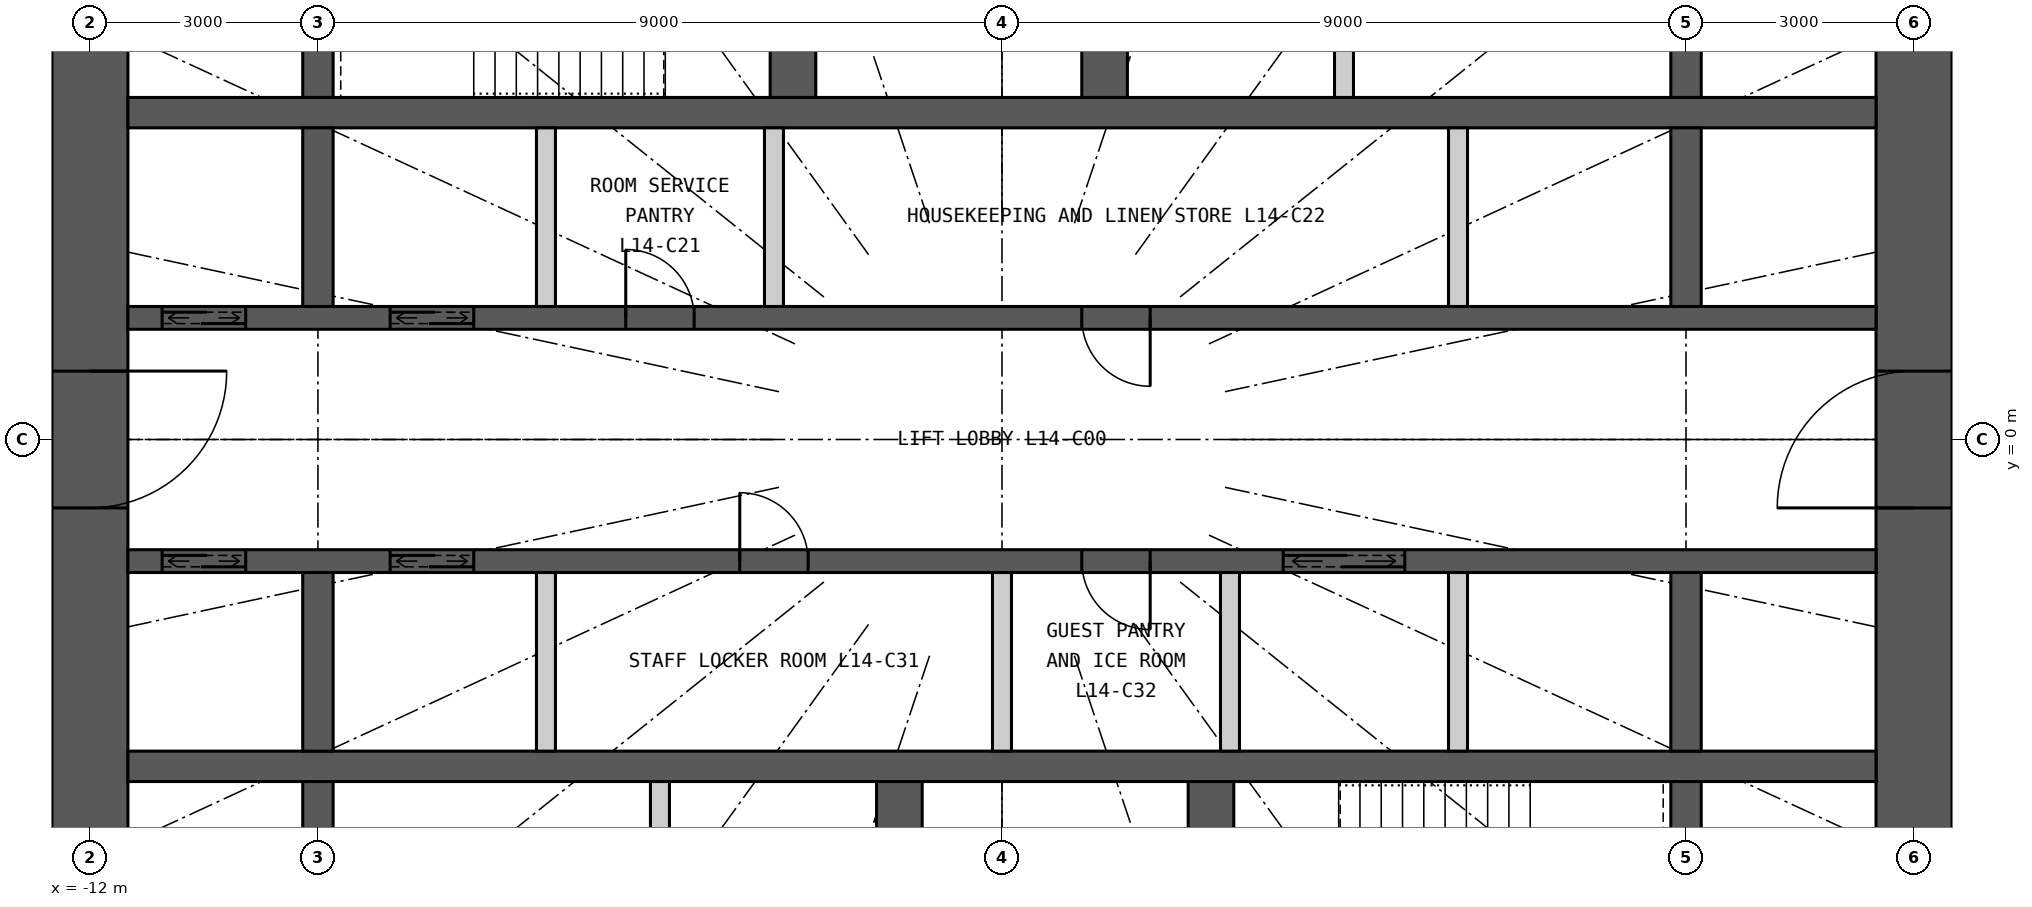
"""IFC4 building model, lengths in metres.
Left out: names, types, materials, properties, quantities, classifications, styles, units other than length and angle.
Written with IfcOpenShell. Run it as: python <this file> out.ifc"""

import sys

from ifc_helpers import new_model, si_unit, direction, frame, frame_2d, origin, place, context, subcontext, project, spatial, rectangle, extrude, element, fill, save


model = new_model("IFC4")
c1 = context("Model", 3, precision=1e-05, world=origin(), true_north=direction((0.0, 1.0)))
c2 = subcontext(c1, "Body", "Model", "MODEL_VIEW")
j1 = project(units=[si_unit("LENGTHUNIT", "METRE"), si_unit("PLANEANGLEUNIT", "RADIAN")], contexts=[c1])
p1 = place(None, origin())
s1 = spatial("IfcSite", under=j1, at=p1, CompositionType="ELEMENT")
p2 = place(p1, origin())
s2 = spatial("IfcBuilding", under=s1, at=p2, CompositionType="ELEMENT")
p3 = place(p2, frame((0.0, 0.0, 60.6)))
s3 = spatial("IfcBuildingStorey", under=s2, at=p3, CompositionType="ELEMENT", Elevation=60.6)
p4 = place(p3, frame((12.0, -7.5, 0.0), z_axis=(0.0, 0.0, 1.0), x_axis=(0.0, 1.0, 0.0)))
e1 = element("IfcWall", 1, at=p4, inside=s3, PredefinedType="SHEAR", context=c2, shape_type="SweptSolid", body=[
    extrude(rectangle(XDim=15.0, YDim=1.0, at=frame_2d((7.5, 0.0))), origin(), (0.0, 0.0, 1.0), 3.3),
])
p5 = place(p4, frame((6.6, 0.0, 0.0)))
e2 = element("IfcOpeningElement", 2, at=p5, cuts=e1, PredefinedType="OPENING", context=c2, shape_type="SweptSolid", body=[
    extrude(rectangle(XDim=1.8, YDim=2.2, at=frame_2d((0.9, 1.1))), frame((0.0, 0.51, 0.0), z_axis=(0.0, -1.0, 0.0), x_axis=(1.0, 0.0, 0.0)), (0.0, 0.0, 1.0), 1.02),
])
p6 = place(p3, frame((-12.0, 7.5, 0.0), z_axis=(0.0, 0.0, 1.0), x_axis=(0.0, -1.0, 0.0)))
e3 = element("IfcWall", 3, at=p6, inside=s3, PredefinedType="SHEAR", context=c2, shape_type="SweptSolid", body=[
    extrude(rectangle(XDim=15.0, YDim=1.0, at=frame_2d((7.5, 0.0))), origin(), (0.0, 0.0, 1.0), 3.3),
])
p7 = place(p6, frame((6.6, 0.0, 0.0)))
e4 = element("IfcOpeningElement", 4, at=p7, cuts=e3, PredefinedType="OPENING", context=c2, shape_type="SweptSolid", body=[
    extrude(rectangle(XDim=1.8, YDim=2.2, at=frame_2d((0.9, 1.1))), frame((0.0, 0.51, 0.0), z_axis=(0.0, -1.0, 0.0), x_axis=(1.0, 0.0, 0.0)), (0.0, 0.0, 1.0), 1.02),
])
p8 = place(p3, frame((-11.5, 4.3, 0.0), z_axis=(0.0, 0.0, 1.0), x_axis=(1.0, 0.0, 0.0)))
e5 = element("IfcWall", 5, at=p8, inside=s3, PredefinedType="SHEAR", context=c2, shape_type="SweptSolid", body=[
    extrude(rectangle(XDim=23.0, YDim=0.4, at=frame_2d((11.5, 0.0))), origin(), (0.0, 0.0, 1.0), 3.3),
])
p9 = place(p3, frame((-11.5, 1.6, 0.0), z_axis=(0.0, 0.0, 1.0), x_axis=(1.0, 0.0, 0.0)))
e6 = element("IfcWall", 6, at=p9, inside=s3, PredefinedType="SHEAR", context=c2, shape_type="SweptSolid", body=[
    extrude(rectangle(XDim=23.0, YDim=0.3, at=frame_2d((11.5, 0.0))), origin(), (0.0, 0.0, 1.0), 3.3),
])
p10 = place(p9, frame((0.45, 0.0, 0.0)))
e7 = element("IfcOpeningElement", 7, at=p10, cuts=e6, PredefinedType="OPENING", context=c2, shape_type="SweptSolid", body=[
    extrude(rectangle(XDim=1.1, YDim=2.2, at=frame_2d((0.55, 1.1))), frame((0.0, 0.16, 0.0), z_axis=(0.0, -1.0, 0.0), x_axis=(1.0, 0.0, 0.0)), (0.0, 0.0, 1.0), 0.32),
])
p11 = place(p9, frame((3.45, 0.0, 0.0)))
e8 = element("IfcOpeningElement", 8, at=p11, cuts=e6, PredefinedType="OPENING", context=c2, shape_type="SweptSolid", body=[
    extrude(rectangle(XDim=1.1, YDim=2.2, at=frame_2d((0.55, 1.1))), frame((0.0, 0.16, 0.0), z_axis=(0.0, -1.0, 0.0), x_axis=(1.0, 0.0, 0.0)), (0.0, 0.0, 1.0), 0.32),
])
p12 = place(p9, frame((6.55, 0.0, 0.0)))
e9 = element("IfcOpeningElement", 9, at=p12, cuts=e6, PredefinedType="OPENING", context=c2, shape_type="SweptSolid", body=[
    extrude(rectangle(XDim=0.9, YDim=2.2, at=frame_2d((0.45, 1.1))), frame((0.0, 0.16, 0.0), z_axis=(0.0, -1.0, 0.0), x_axis=(1.0, 0.0, 0.0)), (0.0, 0.0, 1.0), 0.32),
])
p13 = place(p9, frame((12.55, 0.0, 0.0)))
e10 = element("IfcOpeningElement", 10, at=p13, cuts=e6, PredefinedType="OPENING", context=c2, shape_type="SweptSolid", body=[
    extrude(rectangle(XDim=0.9, YDim=2.2, at=frame_2d((0.45, 1.1))), frame((0.0, 0.16, 0.0), z_axis=(0.0, -1.0, 0.0), x_axis=(1.0, 0.0, 0.0)), (0.0, 0.0, 1.0), 0.32),
])
p14 = place(p3, frame((-11.5, -4.3, 0.0), z_axis=(0.0, 0.0, 1.0), x_axis=(1.0, 0.0, 0.0)))
e11 = element("IfcWall", 11, at=p14, inside=s3, PredefinedType="SHEAR", context=c2, shape_type="SweptSolid", body=[
    extrude(rectangle(XDim=23.0, YDim=0.4, at=frame_2d((11.5, 0.0))), origin(), (0.0, 0.0, 1.0), 3.3),
])
p15 = place(p3, frame((-11.5, -1.6, 0.0), z_axis=(0.0, 0.0, 1.0), x_axis=(1.0, 0.0, 0.0)))
e12 = element("IfcWall", 12, at=p15, inside=s3, PredefinedType="SHEAR", context=c2, shape_type="SweptSolid", body=[
    extrude(rectangle(XDim=23.0, YDim=0.3, at=frame_2d((11.5, 0.0))), origin(), (0.0, 0.0, 1.0), 3.3),
])
p16 = place(p15, frame((0.45, 0.0, 0.0)))
e13 = element("IfcOpeningElement", 13, at=p16, cuts=e12, PredefinedType="OPENING", context=c2, shape_type="SweptSolid", body=[
    extrude(rectangle(XDim=1.1, YDim=2.2, at=frame_2d((0.55, 1.1))), frame((0.0, 0.16, 0.0), z_axis=(0.0, -1.0, 0.0), x_axis=(1.0, 0.0, 0.0)), (0.0, 0.0, 1.0), 0.32),
])
p17 = place(p15, frame((3.45, 0.0, 0.0)))
e14 = element("IfcOpeningElement", 14, at=p17, cuts=e12, PredefinedType="OPENING", context=c2, shape_type="SweptSolid", body=[
    extrude(rectangle(XDim=1.1, YDim=2.2, at=frame_2d((0.55, 1.1))), frame((0.0, 0.16, 0.0), z_axis=(0.0, -1.0, 0.0), x_axis=(1.0, 0.0, 0.0)), (0.0, 0.0, 1.0), 0.32),
])
p18 = place(p15, frame((15.2, 0.0, 0.0)))
e15 = element("IfcOpeningElement", 15, at=p18, cuts=e12, PredefinedType="OPENING", context=c2, shape_type="SweptSolid", body=[
    extrude(rectangle(XDim=1.6, YDim=2.4, at=frame_2d((0.8, 1.2))), frame((0.0, 0.16, 0.0), z_axis=(0.0, -1.0, 0.0), x_axis=(1.0, 0.0, 0.0)), (0.0, 0.0, 1.0), 0.32),
])
p19 = place(p15, frame((8.05, 0.0, 0.0)))
e16 = element("IfcOpeningElement", 16, at=p19, cuts=e12, PredefinedType="OPENING", context=c2, shape_type="SweptSolid", body=[
    extrude(rectangle(XDim=0.9, YDim=2.2, at=frame_2d((0.45, 1.1))), frame((0.0, 0.16, 0.0), z_axis=(0.0, -1.0, 0.0), x_axis=(1.0, 0.0, 0.0)), (0.0, 0.0, 1.0), 0.32),
])
p20 = place(p15, frame((12.55, 0.0, 0.0)))
e17 = element("IfcOpeningElement", 17, at=p20, cuts=e12, PredefinedType="OPENING", context=c2, shape_type="SweptSolid", body=[
    extrude(rectangle(XDim=0.9, YDim=2.2, at=frame_2d((0.45, 1.1))), frame((0.0, 0.16, 0.0), z_axis=(0.0, -1.0, 0.0), x_axis=(1.0, 0.0, 0.0)), (0.0, 0.0, 1.0), 0.32),
])
p21 = place(p3, frame((-9.0, 4.5, 0.0), z_axis=(0.0, 0.0, 1.0), x_axis=(0.0, 1.0, 0.0)))
e18 = element("IfcWall", 18, at=p21, inside=s3, PredefinedType="SHEAR", context=c2, shape_type="SweptSolid", body=[
    extrude(rectangle(XDim=3.0, YDim=0.4, at=frame_2d((1.5, 0.0))), origin(), (0.0, 0.0, 1.0), 3.3),
])
for number, where, z_axis, x_axis in (
    (19, (-9.0, 1.75, 0.0), (0.0, 0.0, 1.0), (0.0, 1.0, 0.0)),
    (20, (-9.0, -4.1, 0.0), (0.0, 0.0, 1.0), (0.0, 1.0, 0.0)),
):
    element("IfcWall", number, at=place(p3, frame(where, z_axis=z_axis, x_axis=x_axis)), inside=s3, PredefinedType="SHEAR", context=c2, shape_type="SweptSolid", body=[
        extrude(rectangle(XDim=2.35, YDim=0.4, at=frame_2d((1.175, 0.0))), origin(), (0.0, 0.0, 1.0), 3.3),
    ])
for number, where, z_axis, x_axis in (
    (21, (-9.0, -7.5, 0.0), (0.0, 0.0, 1.0), (0.0, 1.0, 0.0)),
    (22, (9.0, 4.5, 0.0), (0.0, 0.0, 1.0), (0.0, 1.0, 0.0)),
):
    element("IfcWall", number, at=place(p3, frame(where, z_axis=z_axis, x_axis=x_axis)), inside=s3, PredefinedType="SHEAR", context=c2, shape_type="SweptSolid", body=[
        extrude(rectangle(XDim=3.0, YDim=0.4, at=frame_2d((1.5, 0.0))), origin(), (0.0, 0.0, 1.0), 3.3),
    ])
for number, where, z_axis, x_axis in (
    (23, (9.0, 1.75, 0.0), (0.0, 0.0, 1.0), (0.0, 1.0, 0.0)),
    (24, (9.0, -4.1, 0.0), (0.0, 0.0, 1.0), (0.0, 1.0, 0.0)),
):
    element("IfcWall", number, at=place(p3, frame(where, z_axis=z_axis, x_axis=x_axis)), inside=s3, PredefinedType="SHEAR", context=c2, shape_type="SweptSolid", body=[
        extrude(rectangle(XDim=2.35, YDim=0.4, at=frame_2d((1.175, 0.0))), origin(), (0.0, 0.0, 1.0), 3.3),
    ])
p22 = place(p3, frame((9.0, -7.5, 0.0), z_axis=(0.0, 0.0, 1.0), x_axis=(0.0, 1.0, 0.0)))
e25 = element("IfcWall", 25, at=p22, inside=s3, PredefinedType="SHEAR", context=c2, shape_type="SweptSolid", body=[
    extrude(rectangle(XDim=3.0, YDim=0.4, at=frame_2d((1.5, 0.0))), origin(), (0.0, 0.0, 1.0), 3.3),
])
p23 = place(p3, frame((-2.75, 4.5, 0.0), z_axis=(0.0, 0.0, 1.0), x_axis=(0.0, 1.0, 0.0)))
e26 = element("IfcWall", 26, at=p23, inside=s3, PredefinedType="SHEAR", context=c2, shape_type="SweptSolid", body=[
    extrude(rectangle(XDim=3.0, YDim=0.6, at=frame_2d((1.5, 0.0))), origin(), (0.0, 0.0, 1.0), 3.3),
])
p24 = place(p23, frame((0.925, 0.0, 0.0)))
e27 = element("IfcOpeningElement", 27, at=p24, cuts=e26, PredefinedType="OPENING", context=c2, shape_type="SweptSolid", body=[
    extrude(rectangle(XDim=1.1, YDim=2.2, at=frame_2d((0.55, 1.1))), frame((0.0, 0.31, 0.0), z_axis=(0.0, -1.0, 0.0), x_axis=(1.0, 0.0, 0.0)), (0.0, 0.0, 1.0), 0.62),
])
p25 = place(p3, frame((1.35, 4.5, 0.0), z_axis=(0.0, 0.0, 1.0), x_axis=(0.0, 1.0, 0.0)))
e28 = element("IfcWall", 28, at=p25, inside=s3, PredefinedType="SHEAR", context=c2, shape_type="SweptSolid", body=[
    extrude(rectangle(XDim=3.0, YDim=0.6, at=frame_2d((1.5, 0.0))), origin(), (0.0, 0.0, 1.0), 3.3),
])
p26 = place(p25, frame((0.95, 0.0, 0.0)))
e29 = element("IfcOpeningElement", 29, at=p26, cuts=e28, PredefinedType="OPENING", context=c2, shape_type="SweptSolid", body=[
    extrude(rectangle(XDim=1.1, YDim=2.2, at=frame_2d((0.55, 1.1))), frame((0.0, 0.31, 0.0), z_axis=(0.0, -1.0, 0.0), x_axis=(1.0, 0.0, 0.0)), (0.0, 0.0, 1.0), 0.62),
])
p27 = place(p3, frame((4.5, 4.5, 0.0), z_axis=(0.0, 0.0, 1.0), x_axis=(0.0, 1.0, 0.0)))
e30 = element("IfcWall", 30, at=p27, inside=s3, PredefinedType="PARTITIONING", context=c2, shape_type="SweptSolid", body=[
    extrude(rectangle(XDim=3.0, YDim=0.25, at=frame_2d((1.5, 0.0))), origin(), (0.0, 0.0, 1.0), 3.3),
])
p28 = place(p3, frame((2.75, -7.5, 0.0), z_axis=(0.0, 0.0, 1.0), x_axis=(0.0, 1.0, 0.0)))
e31 = element("IfcWall", 31, at=p28, inside=s3, PredefinedType="SHEAR", context=c2, shape_type="SweptSolid", body=[
    extrude(rectangle(XDim=3.0, YDim=0.6, at=frame_2d((1.5, 0.0))), origin(), (0.0, 0.0, 1.0), 3.3),
])
p29 = place(p28, frame((0.975, 0.0, 0.0)))
e32 = element("IfcOpeningElement", 32, at=p29, cuts=e31, PredefinedType="OPENING", context=c2, shape_type="SweptSolid", body=[
    extrude(rectangle(XDim=1.1, YDim=2.2, at=frame_2d((0.55, 1.1))), frame((0.0, 0.31, 0.0), z_axis=(0.0, -1.0, 0.0), x_axis=(1.0, 0.0, 0.0)), (0.0, 0.0, 1.0), 0.62),
])
p30 = place(p3, frame((-1.35, -7.5, 0.0), z_axis=(0.0, 0.0, 1.0), x_axis=(0.0, 1.0, 0.0)))
e33 = element("IfcWall", 33, at=p30, inside=s3, PredefinedType="SHEAR", context=c2, shape_type="SweptSolid", body=[
    extrude(rectangle(XDim=3.0, YDim=0.6, at=frame_2d((1.5, 0.0))), origin(), (0.0, 0.0, 1.0), 3.3),
])
p31 = place(p30, frame((0.95, 0.0, 0.0)))
e34 = element("IfcOpeningElement", 34, at=p31, cuts=e33, PredefinedType="OPENING", context=c2, shape_type="SweptSolid", body=[
    extrude(rectangle(XDim=1.1, YDim=2.2, at=frame_2d((0.55, 1.1))), frame((0.0, 0.31, 0.0), z_axis=(0.0, -1.0, 0.0), x_axis=(1.0, 0.0, 0.0)), (0.0, 0.0, 1.0), 0.62),
])
p32 = place(p3, frame((-4.5, -7.5, 0.0), z_axis=(0.0, 0.0, 1.0), x_axis=(0.0, 1.0, 0.0)))
e35 = element("IfcWall", 35, at=p32, inside=s3, PredefinedType="PARTITIONING", context=c2, shape_type="SweptSolid", body=[
    extrude(rectangle(XDim=3.0, YDim=0.25, at=frame_2d((1.5, 0.0))), origin(), (0.0, 0.0, 1.0), 3.3),
])
for number, where, z_axis, x_axis in (
    (36, (-6.0, 1.75, 0.0), (0.0, 0.0, 1.0), (0.0, 1.0, 0.0)),
    (37, (-3.0, 1.75, 0.0), (0.0, 0.0, 1.0), (0.0, 1.0, 0.0)),
    (38, (6.0, 1.75, 0.0), (0.0, 0.0, 1.0), (0.0, 1.0, 0.0)),
    (39, (-6.0, -4.1, 0.0), (0.0, 0.0, 1.0), (0.0, 1.0, 0.0)),
    (40, (0.0, -4.1, 0.0), (0.0, 0.0, 1.0), (0.0, 1.0, 0.0)),
    (41, (3.0, -4.1, 0.0), (0.0, 0.0, 1.0), (0.0, 1.0, 0.0)),
    (42, (6.0, -4.1, 0.0), (0.0, 0.0, 1.0), (0.0, 1.0, 0.0)),
):
    element("IfcWall", number, at=place(p3, frame(where, z_axis=z_axis, x_axis=x_axis)), inside=s3, PredefinedType="PARTITIONING", context=c2, shape_type="SweptSolid", body=[
        extrude(rectangle(XDim=2.35, YDim=0.25, at=frame_2d((1.175, 0.0))), origin(), (0.0, 0.0, 1.0), 3.3),
    ])
p33 = place(p10, origin())
e43 = element("IfcDoor", 43, at=p33, inside=s3, OperationType="DOUBLE_DOOR_SLIDING", PredefinedType="DOOR", context=c2, shape_type="SweptSolid", body=[
    extrude(rectangle(XDim=1.1, YDim=2.2, at=frame_2d((0.55, 1.1))), frame((0.0, 0.025, 0.0), z_axis=(0.0, -1.0, 0.0), x_axis=(1.0, 0.0, 0.0)), (0.0, 0.0, 1.0), 0.05),
])
fill(e7, e43)
p34 = place(p11, origin())
e44 = element("IfcDoor", 44, at=p34, inside=s3, OperationType="DOUBLE_DOOR_SLIDING", PredefinedType="DOOR", context=c2, shape_type="SweptSolid", body=[
    extrude(rectangle(XDim=1.1, YDim=2.2, at=frame_2d((0.55, 1.1))), frame((0.0, 0.025, 0.0), z_axis=(0.0, -1.0, 0.0), x_axis=(1.0, 0.0, 0.0)), (0.0, 0.0, 1.0), 0.05),
])
fill(e8, e44)
p35 = place(p16, origin())
e45 = element("IfcDoor", 45, at=p35, inside=s3, OperationType="DOUBLE_DOOR_SLIDING", PredefinedType="DOOR", context=c2, shape_type="SweptSolid", body=[
    extrude(rectangle(XDim=1.1, YDim=2.2, at=frame_2d((0.55, 1.1))), frame((0.0, 0.025, 0.0), z_axis=(0.0, -1.0, 0.0), x_axis=(1.0, 0.0, 0.0)), (0.0, 0.0, 1.0), 0.05),
])
fill(e13, e45)
p36 = place(p17, origin())
e46 = element("IfcDoor", 46, at=p36, inside=s3, OperationType="DOUBLE_DOOR_SLIDING", PredefinedType="DOOR", context=c2, shape_type="SweptSolid", body=[
    extrude(rectangle(XDim=1.1, YDim=2.2, at=frame_2d((0.55, 1.1))), frame((0.0, 0.025, 0.0), z_axis=(0.0, -1.0, 0.0), x_axis=(1.0, 0.0, 0.0)), (0.0, 0.0, 1.0), 0.05),
])
fill(e14, e46)
p37 = place(p18, origin())
e47 = element("IfcDoor", 47, at=p37, inside=s3, OperationType="DOUBLE_DOOR_SLIDING", PredefinedType="DOOR", context=c2, shape_type="SweptSolid", body=[
    extrude(rectangle(XDim=1.6, YDim=2.4, at=frame_2d((0.8, 1.2))), frame((0.0, 0.025, 0.0), z_axis=(0.0, -1.0, 0.0), x_axis=(1.0, 0.0, 0.0)), (0.0, 0.0, 1.0), 0.05),
])
fill(e15, e47)
p38 = place(p12, origin())
e48 = element("IfcDoor", 48, at=p38, inside=s3, OperationType="SINGLE_SWING_LEFT", PredefinedType="DOOR", context=c2, shape_type="SweptSolid", body=[
    extrude(rectangle(XDim=0.9, YDim=2.2, at=frame_2d((0.45, 1.1))), frame((0.0, 0.025, 0.0), z_axis=(0.0, -1.0, 0.0), x_axis=(1.0, 0.0, 0.0)), (0.0, 0.0, 1.0), 0.05),
])
fill(e9, e48)
p39 = place(p13, origin())
e49 = element("IfcDoor", 49, at=p39, inside=s3, OperationType="SINGLE_SWING_RIGHT", PredefinedType="DOOR", context=c2, shape_type="SweptSolid", body=[
    extrude(rectangle(XDim=0.9, YDim=2.2, at=frame_2d((0.45, 1.1))), frame((0.0, 0.025, 0.0), z_axis=(0.0, -1.0, 0.0), x_axis=(1.0, 0.0, 0.0)), (0.0, 0.0, 1.0), 0.05),
])
fill(e10, e49)
p40 = place(p19, origin())
e50 = element("IfcDoor", 50, at=p40, inside=s3, OperationType="SINGLE_SWING_LEFT", PredefinedType="DOOR", context=c2, shape_type="SweptSolid", body=[
    extrude(rectangle(XDim=0.9, YDim=2.2, at=frame_2d((0.45, 1.1))), frame((0.0, 0.025, 0.0), z_axis=(0.0, -1.0, 0.0), x_axis=(1.0, 0.0, 0.0)), (0.0, 0.0, 1.0), 0.05),
])
fill(e16, e50)
p41 = place(p20, origin())
e51 = element("IfcDoor", 51, at=p41, inside=s3, OperationType="SINGLE_SWING_RIGHT", PredefinedType="DOOR", context=c2, shape_type="SweptSolid", body=[
    extrude(rectangle(XDim=0.9, YDim=2.2, at=frame_2d((0.45, 1.1))), frame((0.0, 0.025, 0.0), z_axis=(0.0, -1.0, 0.0), x_axis=(1.0, 0.0, 0.0)), (0.0, 0.0, 1.0), 0.05),
])
fill(e17, e51)
p42 = place(p5, origin())
e52 = element("IfcDoor", 52, at=p42, inside=s3, OperationType="DOUBLE_DOOR_DOUBLE_SWING", PredefinedType="DOOR", context=c2, shape_type="SweptSolid", body=[
    extrude(rectangle(XDim=1.8, YDim=2.2, at=frame_2d((0.9, 1.1))), frame((0.0, 0.025, 0.0), z_axis=(0.0, -1.0, 0.0), x_axis=(1.0, 0.0, 0.0)), (0.0, 0.0, 1.0), 0.05),
])
fill(e2, e52)
p43 = place(p7, origin())
e53 = element("IfcDoor", 53, at=p43, inside=s3, OperationType="DOUBLE_DOOR_DOUBLE_SWING", PredefinedType="DOOR", context=c2, shape_type="SweptSolid", body=[
    extrude(rectangle(XDim=1.8, YDim=2.2, at=frame_2d((0.9, 1.1))), frame((0.0, 0.025, 0.0), z_axis=(0.0, -1.0, 0.0), x_axis=(1.0, 0.0, 0.0)), (0.0, 0.0, 1.0), 0.05),
])
fill(e4, e53)
save(model, sys.argv[1])
